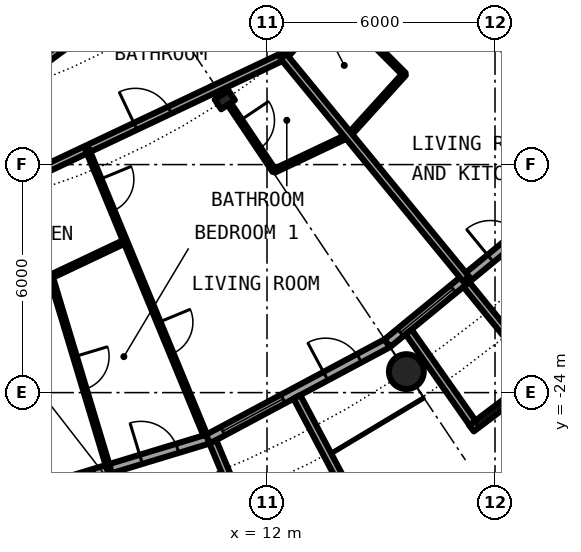
"""IFC4 building model, lengths in metres.
Left out: names, types, materials, properties, quantities, classifications, styles, units other than length and angle.
Written with IfcOpenShell. Run it as: python <this file> out.ifc"""

import sys

from ifc_helpers import new_model, si_unit, direction, frame, frame_2d, origin, origin_2d, place, context, subcontext, project, spatial, rectangle, circle, hollow_circle, i_section, extrude, element, fill, save


model = new_model("IFC4")
c1 = context("Model", 3, precision=1e-05, world=origin(), true_north=direction((0.0, 1.0)))
c2 = subcontext(c1, "Body", "Model", "MODEL_VIEW")
j1 = project(units=[si_unit("LENGTHUNIT", "METRE"), si_unit("PLANEANGLEUNIT", "RADIAN")], contexts=[c1])
p1 = place(None, origin())
s1 = spatial("IfcSite", under=j1, at=p1, CompositionType="ELEMENT")
p2 = place(p1, origin())
s2 = spatial("IfcBuilding", under=s1, at=p2, CompositionType="ELEMENT")
p3 = place(p2, frame((0.0, 0.0, 111.65)))
s3 = spatial("IfcBuildingStorey", under=s2, at=p3, CompositionType="ELEMENT", Elevation=111.65)
p4 = place(p3, frame((15.667, -23.448, 0.0), z_axis=(0.0, 0.0, 1.0), x_axis=(1.0, 0.0, 0.0)))
e1 = element("IfcColumn", 1, at=p4, inside=s3, PredefinedType="COLUMN", context=c2, shape_type="SweptSolid", body=[
    extrude(hollow_circle(Radius=0.457, WallThickness=0.04, at=origin_2d()), origin(), (0.0, 0.0, 1.0), 3.05),
])
p5 = place(p3, frame((10.889, -16.297, 0.0), z_axis=(0.0, 0.0, 1.0), x_axis=(0.55557023302, -0.831469612303, 0.0)))
e2 = element("IfcColumn", 2, at=p5, inside=s3, PredefinedType="COLUMN", context=c2, shape_type="SweptSolid", body=[
    extrude(i_section(OverallWidth=0.307, OverallDepth=0.432, WebThickness=0.021, FlangeThickness=0.04, FilletRadius=0.027, at=origin_2d()), origin(), (0.0, 0.0, 1.0), 3.05),
])
p6 = place(p3, frame((5.326, -26.775, 0.0), z_axis=(0.0, 0.0, 1.0), x_axis=(0.956965678721, 0.290201119486, 0.0)))
e3 = element("IfcWall", 3, at=p6, inside=s3, PredefinedType="SOLIDWALL", context=c2, shape_type="SweptSolid", body=[
    extrude(rectangle(XDim=5.351, YDim=0.25, at=frame_2d((2.676, 0.0))), origin(), (0.0, 0.0, 1.0), 2.7),
])
p7 = place(p6, frame((0.441, 0.0, 0.3)))
e4 = element("IfcOpeningElement", 4, at=p7, cuts=e3, PredefinedType="OPENING", context=c2, shape_type="SweptSolid", body=[
    extrude(rectangle(XDim=1.8, YDim=2.1, at=frame_2d((0.9, 1.05))), frame((0.0, 0.135, 0.0), z_axis=(0.0, -1.0, 0.0), x_axis=(1.0, 0.0, 0.0)), (0.0, 0.0, 1.0), 0.27),
])
p8 = place(p6, frame((3.51, 0.0, 0.0)))
e5 = element("IfcOpeningElement", 5, at=p8, cuts=e3, PredefinedType="OPENING", context=c2, shape_type="SweptSolid", body=[
    extrude(rectangle(XDim=1.0, YDim=2.2, at=frame_2d((0.5, 1.1))), frame((0.0, 0.135, 0.0), z_axis=(0.0, -1.0, 0.0), x_axis=(1.0, 0.0, 0.0)), (0.0, 0.0, 1.0), 0.27),
])
p9 = place(p3, frame((10.447, -25.222, 0.0), z_axis=(0.0, 0.0, 1.0), x_axis=(0.881915646801, 0.471407246368, 0.0)))
e6 = element("IfcWall", 6, at=p9, inside=s3, PredefinedType="SOLIDWALL", context=c2, shape_type="SweptSolid", body=[
    extrude(rectangle(XDim=5.352, YDim=0.25, at=frame_2d((2.676, 0.0))), origin(), (0.0, 0.0, 1.0), 2.7),
])
p10 = place(p9, frame((0.441, 0.0, 0.3)))
e7 = element("IfcOpeningElement", 7, at=p10, cuts=e6, PredefinedType="OPENING", context=c2, shape_type="SweptSolid", body=[
    extrude(rectangle(XDim=1.8, YDim=2.1, at=frame_2d((0.9, 1.05))), frame((0.0, 0.135, 0.0), z_axis=(0.0, -1.0, 0.0), x_axis=(1.0, 0.0, 0.0)), (0.0, 0.0, 1.0), 0.27),
])
p11 = place(p9, frame((3.51, 0.0, 0.0)))
e8 = element("IfcOpeningElement", 8, at=p11, cuts=e6, PredefinedType="OPENING", context=c2, shape_type="SweptSolid", body=[
    extrude(rectangle(XDim=1.0, YDim=2.2, at=frame_2d((0.5, 1.1))), frame((0.0, 0.135, 0.0), z_axis=(0.0, -1.0, 0.0), x_axis=(1.0, 0.0, 0.0)), (0.0, 0.0, 1.0), 0.27),
])
p12 = place(p3, frame((10.575, -25.295, -0.03), z_axis=(0.0, 0.0, 1.0), x_axis=(0.385697364644, -0.922625353492, 0.0)))
e9 = element("IfcWall", 9, at=p12, inside=s3, PredefinedType="SOLIDWALL", context=c2, shape_type="SweptSolid", body=[
    extrude(rectangle(XDim=2.883, YDim=0.2, at=frame_2d((1.442, 0.0))), origin(), (0.0, 0.0, 1.0), 2.73),
])
p13 = place(p3, frame((12.787, -24.113, -0.03), z_axis=(0.0, 0.0, 1.0), x_axis=(0.468365282436, -0.883534924159, 0.0)))
e10 = element("IfcWall", 10, at=p13, inside=s3, PredefinedType="SOLIDWALL", context=c2, shape_type="SweptSolid", body=[
    extrude(rectangle(XDim=3.006, YDim=0.2, at=frame_2d((1.503, 0.0))), origin(), (0.0, 0.0, 1.0), 2.73),
])
p14 = place(p3, frame((15.167, -22.699, 0.0), z_axis=(0.0, 0.0, 1.0), x_axis=(0.773019449054, 0.634382322723, 0.0)))
e11 = element("IfcWall", 11, at=p14, inside=s3, PredefinedType="SOLIDWALL", context=c2, shape_type="SweptSolid", body=[
    extrude(rectangle(XDim=5.352, YDim=0.25, at=frame_2d((2.676, 0.0))), origin(), (0.0, 0.0, 1.0), 2.7),
])
p15 = place(p14, frame((0.441, 0.0, 0.3)))
e12 = element("IfcOpeningElement", 12, at=p15, cuts=e11, PredefinedType="OPENING", context=c2, shape_type="SweptSolid", body=[
    extrude(rectangle(XDim=1.8, YDim=2.1, at=frame_2d((0.9, 1.05))), frame((0.0, 0.135, 0.0), z_axis=(0.0, -1.0, 0.0), x_axis=(1.0, 0.0, 0.0)), (0.0, 0.0, 1.0), 0.27),
])
p16 = place(p14, frame((3.51, 0.0, 0.0)))
e13 = element("IfcOpeningElement", 13, at=p16, cuts=e11, PredefinedType="OPENING", context=c2, shape_type="SweptSolid", body=[
    extrude(rectangle(XDim=1.0, YDim=2.2, at=frame_2d((0.5, 1.1))), frame((0.0, 0.135, 0.0), z_axis=(0.0, -1.0, 0.0), x_axis=(1.0, 0.0, 0.0)), (0.0, 0.0, 1.0), 0.27),
])
p17 = place(p3, frame((17.382, -24.94, -0.03), z_axis=(0.0, 0.0, 1.0), x_axis=(0.797456837111, 0.603375996329, 0.0)))
e14 = element("IfcWall", 14, at=p17, inside=s3, PredefinedType="SOLIDWALL", context=c2, shape_type="SweptSolid", body=[
    extrude(rectangle(XDim=2.391, YDim=0.2, at=frame_2d((1.196, 0.0))), origin(), (0.0, 0.0, 1.0), 2.73),
])
p18 = place(p17, frame((0.156, 0.0, 0.33)))
e15 = element("IfcOpeningElement", 15, at=p18, cuts=e14, PredefinedType="OPENING", context=c2, shape_type="SweptSolid", body=[
    extrude(circle(Radius=1.04, at=frame_2d((1.04, 1.04))), frame((0.0, 0.11, 0.0), z_axis=(0.0, -1.0, 0.0), x_axis=(1.0, 0.0, 0.0)), (0.0, 0.0, 1.0), 0.22),
])
p19 = place(p3, frame((15.726, -22.402, -0.03), z_axis=(0.0, 0.0, 1.0), x_axis=(0.574826383135, -0.818275399393, 0.0)))
e16 = element("IfcWall", 16, at=p19, inside=s3, PredefinedType="SOLIDWALL", context=c2, shape_type="SweptSolid", body=[
    extrude(rectangle(XDim=2.929, YDim=0.2, at=frame_2d((1.465, 0.0))), origin(), (0.0, 0.0, 1.0), 2.73),
])
p20 = place(p3, frame((17.246, -21.155, -0.03), z_axis=(0.0, 0.0, 1.0), x_axis=(0.631741648902, -0.775179004516, 0.0)))
e17 = element("IfcWall", 17, at=p20, inside=s3, PredefinedType="SOLIDWALL", context=c2, shape_type="SweptSolid", body=[
    extrude(rectangle(XDim=3.006, YDim=0.2, at=frame_2d((1.503, 0.0))), origin(), (0.0, 0.0, 1.0), 2.73),
])
p21 = place(p3, frame((14.153, -17.234, 0.0), z_axis=(0.0, 0.0, 1.0), x_axis=(0.671144831591, 0.741326254107, 0.0)))
e18 = element("IfcWall", 18, at=p21, inside=s3, PredefinedType="PARTITIONING", context=c2, shape_type="SweptSolid", body=[
    extrude(rectangle(XDim=2.181, YDim=0.1, at=frame_2d((1.091, 0.0))), origin(), (0.0, 0.0, 1.0), 2.7),
])
p22 = place(p3, frame((4.352, -21.873, 0.0), z_axis=(0.0, 0.0, 1.0), x_axis=(0.903905215872, 0.427732814639, 0.0)))
e19 = element("IfcWall", 19, at=p22, inside=s3, PredefinedType="PARTITIONING", context=c2, shape_type="SweptSolid", body=[
    extrude(rectangle(XDim=4.334, YDim=0.1, at=frame_2d((2.167, 0.0))), origin(), (0.0, 0.0, 1.0), 2.7),
])
p23 = place(p3, frame((12.188, -18.165, 0.0), z_axis=(0.0, 0.0, 1.0), x_axis=(0.903905215872, 0.427732814639, 0.0)))
e20 = element("IfcWall", 20, at=p23, inside=s3, PredefinedType="PARTITIONING", context=c2, shape_type="SweptSolid", body=[
    extrude(rectangle(XDim=2.167, YDim=0.1, at=frame_2d((1.083, 0.0))), origin(), (0.0, 0.0, 1.0), 2.7),
])
p24 = place(p3, frame((12.434, -15.151, 0.0), z_axis=(0.0, 0.0, 1.0), x_axis=(0.671481997275, 0.741020868354, 0.0)))
e21 = element("IfcWall", 21, at=p24, inside=s3, PredefinedType="PARTITIONING", context=c2, shape_type="SweptSolid", body=[
    extrude(rectangle(XDim=5.596, YDim=0.2, at=frame_2d((2.798, 0.0))), origin(), (0.0, 0.0, 1.0), 2.39),
])
p25 = place(p24, frame((3.319, 0.0, 0.0)))
e22 = element("IfcOpeningElement", 22, at=p25, cuts=e21, PredefinedType="OPENING", context=c2, shape_type="SweptSolid", body=[
    extrude(rectangle(XDim=1.0, YDim=2.3, at=frame_2d((0.5, 1.15))), frame((0.0, 0.11, 0.0), z_axis=(0.0, -1.0, 0.0), x_axis=(1.0, 0.0, 0.0)), (0.0, 0.0, 1.0), 0.22),
])
p26 = place(p3, frame((3.967, -19.155, 0.0), z_axis=(0.0, 0.0, 1.0), x_axis=(0.904003983145, 0.427524032609, 0.0)))
e23 = element("IfcWall", 23, at=p26, inside=s3, PredefinedType="PARTITIONING", context=c2, shape_type="SweptSolid", body=[
    extrude(rectangle(XDim=9.37, YDim=0.2, at=frame_2d((4.685, 0.0))), origin(), (0.0, 0.0, 1.0), 2.39),
])
p27 = place(p26, frame((5.056, 0.0, 0.0)))
e24 = element("IfcOpeningElement", 24, at=p27, cuts=e23, PredefinedType="OPENING", context=c2, shape_type="SweptSolid", body=[
    extrude(rectangle(XDim=1.0, YDim=2.3, at=frame_2d((0.5, 1.15))), frame((0.0, 0.11, 0.0), z_axis=(0.0, -1.0, 0.0), x_axis=(1.0, 0.0, 0.0)), (0.0, 0.0, 1.0), 0.22),
])
p28 = place(p3, frame((4.906, -16.172, 0.0), z_axis=(0.0, 0.0, 1.0), x_axis=(0.803191461888, 0.595720971219, 0.0)))
e25 = element("IfcWall", 25, at=p28, inside=s3, PredefinedType="PARTITIONING", context=c2, shape_type="SweptSolid", body=[
    extrude(rectangle(XDim=9.76, YDim=0.2, at=frame_2d((4.88, 0.0))), origin(), (0.0, 0.0, 1.0), 2.7),
])
p29 = place(p28, frame((4.38, 0.0, 0.0)))
e26 = element("IfcOpeningElement", 26, at=p29, cuts=e25, PredefinedType="OPENING", context=c2, shape_type="SweptSolid", body=[
    extrude(rectangle(XDim=1.0, YDim=2.3, at=frame_2d((0.5, 1.15))), frame((0.0, 0.11, 0.0), z_axis=(0.0, -1.0, 0.0), x_axis=(1.0, 0.0, 0.0)), (0.0, 0.0, 1.0), 0.22),
])
p30 = place(p3, frame((6.31, -20.945, 0.0), z_axis=(0.0, 0.0, 1.0), x_axis=(0.288484435279, -0.957484585047, 0.0)))
e27 = element("IfcWall", 27, at=p30, inside=s3, PredefinedType="PARTITIONING", context=c2, shape_type="SweptSolid", body=[
    extrude(rectangle(XDim=5.3, YDim=0.1, at=frame_2d((2.65, 0.0))), origin(), (0.0, 0.0, 1.0), 2.7),
])
p31 = place(p30, frame((2.2, 0.0, 0.0)))
e28 = element("IfcOpeningElement", 28, at=p31, cuts=e27, PredefinedType="OPENING", context=c2, shape_type="SweptSolid", body=[
    extrude(rectangle(XDim=0.9, YDim=2.3, at=frame_2d((0.45, 1.15))), frame((0.0, 0.06, 0.0), z_axis=(0.0, -1.0, 0.0), x_axis=(1.0, 0.0, 0.0)), (0.0, 0.0, 1.0), 0.12),
])
p32 = place(p3, frame((7.268, -17.594, 0.0), z_axis=(0.0, 0.0, 1.0), x_axis=(0.381763497026, -0.924260045841, 0.0)))
e29 = element("IfcWall", 29, at=p32, inside=s3, PredefinedType="PARTITIONING", context=c2, shape_type="SweptSolid", body=[
    extrude(rectangle(XDim=8.138, YDim=0.1, at=frame_2d((4.069, 0.0))), origin(), (0.0, 0.0, 1.0), 2.7),
])
p33 = place(p32, frame((0.861, 0.0, 0.0)))
e30 = element("IfcOpeningElement", 30, at=p33, cuts=e29, PredefinedType="OPENING", context=c2, shape_type="SweptSolid", body=[
    extrude(rectangle(XDim=0.9, YDim=2.3, at=frame_2d((0.45, 1.15))), frame((0.0, 0.06, 0.0), z_axis=(0.0, -1.0, 0.0), x_axis=(1.0, 0.0, 0.0)), (0.0, 0.0, 1.0), 0.12),
])
p34 = place(p32, frame((4.93, 0.0, 0.0)))
e31 = element("IfcOpeningElement", 31, at=p34, cuts=e29, PredefinedType="OPENING", context=c2, shape_type="SweptSolid", body=[
    extrude(rectangle(XDim=0.9, YDim=2.3, at=frame_2d((0.45, 1.15))), frame((0.0, 0.06, 0.0), z_axis=(0.0, -1.0, 0.0), x_axis=(1.0, 0.0, 0.0)), (0.0, 0.0, 1.0), 0.12),
])
p35 = place(p3, frame((11.041, -16.455, 0.0), z_axis=(0.0, 0.0, 1.0), x_axis=(0.557051175603, -0.830478168141, 0.0)))
e32 = element("IfcWall", 32, at=p35, inside=s3, PredefinedType="PARTITIONING", context=c2, shape_type="SweptSolid", body=[
    extrude(rectangle(XDim=2.059, YDim=0.1, at=frame_2d((1.03, 0.0))), origin(), (0.0, 0.0, 1.0), 2.7),
])
p36 = place(p35, frame((0.46, 0.0, 0.0)))
e33 = element("IfcOpeningElement", 33, at=p36, cuts=e32, PredefinedType="OPENING", context=c2, shape_type="SweptSolid", body=[
    extrude(rectangle(XDim=0.9, YDim=2.3, at=frame_2d((0.45, 1.15))), frame((0.0, 0.06, 0.0), z_axis=(0.0, -1.0, 0.0), x_axis=(1.0, 0.0, 0.0)), (0.0, 0.0, 1.0), 0.12),
])
p37 = place(p3, frame((12.432, -15.152, 0.0), z_axis=(0.0, 0.0, 1.0), x_axis=(0.634353152115, -0.77304338714, 0.0)))
e34 = element("IfcWall", 34, at=p37, inside=s3, PredefinedType="PARTITIONING", context=c2, shape_type="SweptSolid", body=[
    extrude(rectangle(XDim=7.576, YDim=0.2, at=frame_2d((3.788, 0.0))), origin(), (0.0, 0.0, 1.0), 2.7),
])
p38 = place(p3, frame((13.722, -13.73, 0.0), z_axis=(0.0, 0.0, 1.0), x_axis=(0.706741540154, -0.707471833659, 0.0)))
e35 = element("IfcWall", 35, at=p38, inside=s3, PredefinedType="PARTITIONING", context=c2, shape_type="SweptSolid", body=[
    extrude(rectangle(XDim=2.674, YDim=0.1, at=frame_2d((1.337, 0.0))), origin(), (0.0, 0.0, 1.0), 2.7),
])
p39 = place(p38, frame((0.887, 0.0, 0.0)))
e36 = element("IfcOpeningElement", 36, at=p39, cuts=e35, PredefinedType="OPENING", context=c2, shape_type="SweptSolid", body=[
    extrude(rectangle(XDim=0.9, YDim=2.3, at=frame_2d((0.45, 1.15))), frame((0.0, 0.06, 0.0), z_axis=(0.0, -1.0, 0.0), x_axis=(1.0, 0.0, 0.0)), (0.0, 0.0, 1.0), 0.12),
])
p40 = place(p3, frame((16.477, -11.009, 0.0), z_axis=(0.0, 0.0, 1.0), x_axis=(0.831467903109, -0.555572791, 0.0)))
e37 = element("IfcWall", 37, at=p40, inside=s3, PredefinedType="PARTITIONING", context=c2, shape_type="SweptSolid", body=[
    extrude(rectangle(XDim=7.358, YDim=0.2, at=frame_2d((3.679, 0.0))), origin(), (0.0, 0.0, 1.0), 2.7),
])
p41 = place(p3, frame((17.077, -14.006, 0.0), z_axis=(0.0, 0.0, 1.0), x_axis=(0.77326214499, -0.634086472908, 0.0)))
e38 = element("IfcWall", 38, at=p41, inside=s3, PredefinedType="PARTITIONING", context=c2, shape_type="SweptSolid", body=[
    extrude(rectangle(XDim=5.089, YDim=0.1, at=frame_2d((2.544, 0.0))), origin(), (0.0, 0.0, 1.0), 2.7),
])
p42 = place(p41, frame((2.094, 0.0, 0.0)))
e39 = element("IfcOpeningElement", 39, at=p42, cuts=e38, PredefinedType="OPENING", context=c2, shape_type="SweptSolid", body=[
    extrude(rectangle(XDim=0.9, YDim=2.3, at=frame_2d((0.45, 1.15))), frame((0.0, 0.06, 0.0), z_axis=(0.0, -1.0, 0.0), x_axis=(1.0, 0.0, 0.0)), (0.0, 0.0, 1.0), 0.12),
])
p43 = place(p8, origin())
e40 = element("IfcDoor", 40, at=p43, inside=s3, OperationType="SINGLE_SWING_LEFT", PredefinedType="DOOR", context=c2, shape_type="SweptSolid", body=[
    extrude(rectangle(XDim=1.0, YDim=2.2, at=frame_2d((0.5, 1.1))), frame((0.0, 0.025, 0.0), z_axis=(0.0, -1.0, 0.0), x_axis=(1.0, 0.0, 0.0)), (0.0, 0.0, 1.0), 0.05),
])
fill(e5, e40)
p44 = place(p10, origin())
e41 = element("IfcWindow", 41, at=p44, inside=s3, PartitioningType="SINGLE_PANEL", PredefinedType="WINDOW", context=c2, shape_type="SweptSolid", body=[
    extrude(rectangle(XDim=1.8, YDim=2.1, at=frame_2d((0.9, 1.05))), frame((0.0, 0.03, 0.0), z_axis=(0.0, -1.0, 0.0), x_axis=(1.0, 0.0, 0.0)), (0.0, 0.0, 1.0), 0.06),
])
fill(e7, e41)
p45 = place(p11, origin())
e42 = element("IfcDoor", 42, at=p45, inside=s3, OperationType="SINGLE_SWING_LEFT", PredefinedType="DOOR", context=c2, shape_type="SweptSolid", body=[
    extrude(rectangle(XDim=1.0, YDim=2.2, at=frame_2d((0.5, 1.1))), frame((0.0, 0.025, 0.0), z_axis=(0.0, -1.0, 0.0), x_axis=(1.0, 0.0, 0.0)), (0.0, 0.0, 1.0), 0.05),
])
fill(e8, e42)
p46 = place(p15, origin())
e43 = element("IfcWindow", 43, at=p46, inside=s3, PartitioningType="SINGLE_PANEL", PredefinedType="WINDOW", context=c2, shape_type="SweptSolid", body=[
    extrude(rectangle(XDim=1.8, YDim=2.1, at=frame_2d((0.9, 1.05))), frame((0.0, 0.03, 0.0), z_axis=(0.0, -1.0, 0.0), x_axis=(1.0, 0.0, 0.0)), (0.0, 0.0, 1.0), 0.06),
])
fill(e12, e43)
p47 = place(p18, origin())
e44 = element("IfcWindow", 44, at=p47, inside=s3, PartitioningType="SINGLE_PANEL", PredefinedType="WINDOW", context=c2, shape_type="SweptSolid", body=[
    extrude(circle(Radius=1.04, at=frame_2d((1.04, 1.04))), frame((0.0, 0.03, 0.0), z_axis=(0.0, -1.0, 0.0), x_axis=(1.0, 0.0, 0.0)), (0.0, 0.0, 1.0), 0.06),
])
fill(e15, e44)
p48 = place(p16, origin())
e45 = element("IfcDoor", 45, at=p48, inside=s3, OperationType="SINGLE_SWING_LEFT", PredefinedType="DOOR", context=c2, shape_type="SweptSolid", body=[
    extrude(rectangle(XDim=1.0, YDim=2.2, at=frame_2d((0.5, 1.1))), frame((0.0, 0.025, 0.0), z_axis=(0.0, -1.0, 0.0), x_axis=(1.0, 0.0, 0.0)), (0.0, 0.0, 1.0), 0.05),
])
fill(e13, e45)
p49 = place(p27, origin())
e46 = element("IfcDoor", 46, at=p49, inside=s3, OperationType="SINGLE_SWING_RIGHT", PredefinedType="DOOR", context=c2, shape_type="SweptSolid", body=[
    extrude(rectangle(XDim=1.0, YDim=2.3, at=frame_2d((0.5, 1.15))), frame((0.0, 0.025, 0.0), z_axis=(0.0, -1.0, 0.0), x_axis=(1.0, 0.0, 0.0)), (0.0, 0.0, 1.0), 0.05),
])
fill(e24, e46)
p50 = place(p36, origin())
e47 = element("IfcDoor", 47, at=p50, inside=s3, OperationType="SINGLE_SWING_LEFT", PredefinedType="DOOR", context=c2, shape_type="SweptSolid", body=[
    extrude(rectangle(XDim=0.9, YDim=2.3, at=frame_2d((0.45, 1.15))), frame((0.0, 0.025, 0.0), z_axis=(0.0, -1.0, 0.0), x_axis=(1.0, 0.0, 0.0)), (0.0, 0.0, 1.0), 0.05),
])
fill(e33, e47)
p51 = place(p33, origin())
e48 = element("IfcDoor", 48, at=p51, inside=s3, OperationType="SINGLE_SWING_LEFT", PredefinedType="DOOR", context=c2, shape_type="SweptSolid", body=[
    extrude(rectangle(XDim=0.9, YDim=2.3, at=frame_2d((0.45, 1.15))), frame((0.0, 0.025, 0.0), z_axis=(0.0, -1.0, 0.0), x_axis=(1.0, 0.0, 0.0)), (0.0, 0.0, 1.0), 0.05),
])
fill(e30, e48)
p52 = place(p34, origin())
e49 = element("IfcDoor", 49, at=p52, inside=s3, OperationType="SINGLE_SWING_RIGHT", PredefinedType="DOOR", context=c2, shape_type="SweptSolid", body=[
    extrude(rectangle(XDim=0.9, YDim=2.3, at=frame_2d((0.45, 1.15))), frame((0.0, 0.025, 0.0), z_axis=(0.0, -1.0, 0.0), x_axis=(1.0, 0.0, 0.0)), (0.0, 0.0, 1.0), 0.05),
])
fill(e31, e49)
p53 = place(p31, origin())
e50 = element("IfcDoor", 50, at=p53, inside=s3, OperationType="SINGLE_SWING_RIGHT", PredefinedType="DOOR", context=c2, shape_type="SweptSolid", body=[
    extrude(rectangle(XDim=0.9, YDim=2.3, at=frame_2d((0.45, 1.15))), frame((0.0, 0.025, 0.0), z_axis=(0.0, -1.0, 0.0), x_axis=(1.0, 0.0, 0.0)), (0.0, 0.0, 1.0), 0.05),
])
fill(e28, e50)
save(model, sys.argv[1])
